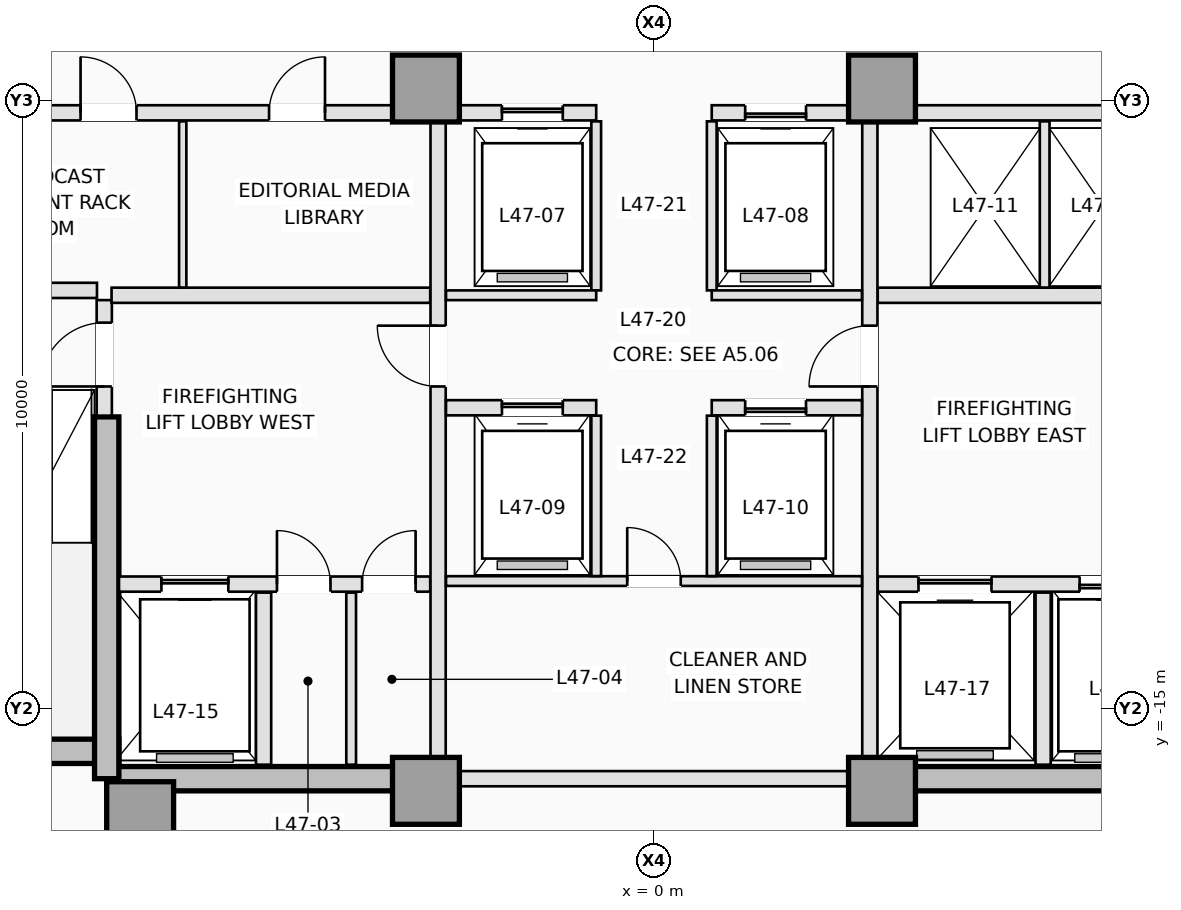
"""IFC4 building model, lengths in metres.
Left out: names, types, materials, properties, quantities, classifications, styles, units other than length and angle.
Written with IfcOpenShell. Run it as: python <this file> out.ifc"""

import sys

from ifc_helpers import new_model, si_unit, direction, frame, frame_2d, origin, origin_2d, place, context, subcontext, project, spatial, rectangle, extrude, element, fill, save


model = new_model("IFC4")
c1 = context("Model", 3, precision=1e-05, world=origin(), true_north=direction((0.0, 1.0)))
c2 = subcontext(c1, "Body", "Model", "MODEL_VIEW")
j1 = project(units=[si_unit("LENGTHUNIT", "METRE"), si_unit("PLANEANGLEUNIT", "RADIAN")], contexts=[c1])
p1 = place(None, origin())
s1 = spatial("IfcSite", under=j1, at=p1, CompositionType="ELEMENT")
p2 = place(p1, origin())
s2 = spatial("IfcBuilding", under=s1, at=p2, CompositionType="ELEMENT")
p3 = place(p2, frame((0.0, 0.0, 172.0)))
s3 = spatial("IfcBuildingStorey", under=s2, at=p3, CompositionType="ELEMENT", Elevation=172.0)
p4 = place(p3, frame((-12.6, -15.7, 0.0), z_axis=(0.0, 0.0, 1.0), x_axis=(1.0, 0.0, 0.0)))
e1 = element("IfcWall", 1, at=p4, inside=s3, PredefinedType="SHEAR", context=c2, shape_type="SweptSolid", body=[
    extrude(rectangle(XDim=3.8, YDim=0.4, at=frame_2d((1.9, 0.0))), origin(), (0.0, 0.0, 1.0), 3.5),
])
for number, where, z_axis, x_axis in (
    (2, (-9.0, -16.15, 0.0), (0.0, 0.0, 1.0), (1.0, 0.0, 0.0)),
    (3, (3.75, -16.15, 0.0), (0.0, 0.0, 1.0), (1.0, 0.0, 0.0)),
):
    element("IfcWall", number, at=place(p3, frame(where, z_axis=z_axis, x_axis=x_axis)), inside=s3, PredefinedType="SHEAR", context=c2, shape_type="SweptSolid", body=[
        extrude(rectangle(XDim=5.25, YDim=0.4, at=frame_2d((2.625, 0.0))), origin(), (0.0, 0.0, 1.0), 3.5),
    ])
p5 = place(p3, frame((-9.0, -16.15, 0.0), z_axis=(0.0, 0.0, 1.0), x_axis=(0.0, 1.0, 0.0)))
e4 = element("IfcWall", 4, at=p5, inside=s3, PredefinedType="SHEAR", context=c2, shape_type="SweptSolid", body=[
    extrude(rectangle(XDim=5.95, YDim=0.4, at=frame_2d((2.975, 0.0))), origin(), (0.0, 0.0, 1.0), 3.5),
])
for number, where, z_axis, x_axis in (
    (5, (-8.45, -16.75, 0.0), (0.0, 0.0, 1.0), (1.0, 0.0, 0.0)),
    (6, (-3.75, -16.35, 0.0), (0.0, 0.0, 1.0), (1.0, 0.0, 0.0)),
    (7, (3.75, -16.35, 0.0), (0.0, 0.0, 1.0), (1.0, 0.0, 0.0)),
    (8, (-3.75, -4.8, 0.0), (0.0, 0.0, 1.0), (1.0, 0.0, 0.0)),
    (9, (3.75, -4.8, 0.0), (0.0, 0.0, 1.0), (1.0, 0.0, 0.0)),
):
    element("IfcColumn", number, at=place(p3, frame(where, z_axis=z_axis, x_axis=x_axis)), inside=s3, PredefinedType="COLUMN", context=c2, shape_type="SweptSolid", body=[
        extrude(rectangle(XDim=1.1, YDim=1.1, at=origin_2d()), origin(), (0.0, 0.0, 1.0), 3.5),
    ])
p6 = place(p3, frame((-9.04, -10.18, 0.0), z_axis=(0.0, 0.0, 1.0), x_axis=(0.0, 1.0, 0.0)))
e10 = element("IfcWall", 10, at=p6, inside=s3, PredefinedType="PARTITIONING", context=c2, shape_type="SweptSolid", body=[
    extrude(rectangle(XDim=1.9, YDim=0.25, at=frame_2d((0.95, 0.0))), origin(), (0.0, 0.0, 1.0), 3.25),
])
p7 = place(p6, frame((0.48, 0.0, 0.0)))
e11 = element("IfcOpeningElement", 11, at=p7, cuts=e10, PredefinedType="OPENING", context=c2, shape_type="SweptSolid", body=[
    extrude(rectangle(XDim=1.05, YDim=2.15, at=frame_2d((0.525, 1.075))), frame((0.0, 0.135, 0.0), z_axis=(0.0, -1.0, 0.0), x_axis=(1.0, 0.0, 0.0)), (0.0, 0.0, 1.0), 0.27),
])
p8 = place(p3, frame((-12.38, -8.12, 0.0), z_axis=(0.0, 0.0, 1.0), x_axis=(1.0, 0.0, 0.0)))
e12 = element("IfcWall", 12, at=p8, inside=s3, PredefinedType="PARTITIONING", context=c2, shape_type="SweptSolid", body=[
    extrude(rectangle(XDim=3.22, YDim=0.25, at=frame_2d((1.61, 0.0))), origin(), (0.0, 0.0, 1.0), 3.25),
])
p9 = place(p3, frame((-8.798, -12.95, 0.0), z_axis=(0.0, 0.0, 1.0), x_axis=(1.0, 0.0, 0.0)))
e13 = element("IfcWall", 13, at=p9, inside=s3, PredefinedType="PARTITIONING", context=c2, shape_type="SweptSolid", body=[
    extrude(rectangle(XDim=5.118, YDim=0.25, at=frame_2d((2.559, 0.0))), origin(), (0.0, 0.0, 1.0), 3.25),
])
p10 = place(p9, frame((0.698, 0.0, 0.0)))
e14 = element("IfcOpeningElement", 14, at=p10, cuts=e13, PredefinedType="OPENING", context=c2, shape_type="SweptSolid", body=[
    extrude(rectangle(XDim=1.1, YDim=2.15, at=frame_2d((0.55, 1.075))), frame((0.0, 0.135, 0.0), z_axis=(0.0, -1.0, 0.0), x_axis=(1.0, 0.0, 0.0)), (0.0, 0.0, 1.0), 0.27),
])
p11 = place(p9, frame((2.598, 0.0, 0.0)))
e15 = element("IfcOpeningElement", 15, at=p11, cuts=e13, PredefinedType="OPENING", context=c2, shape_type="SweptSolid", body=[
    extrude(rectangle(XDim=0.88, YDim=2.1, at=frame_2d((0.44, 1.05))), frame((0.0, 0.135, 0.0), z_axis=(0.0, -1.0, 0.0), x_axis=(1.0, 0.0, 0.0)), (0.0, 0.0, 1.0), 0.27),
])
p12 = place(p9, frame((3.998, 0.0, 0.0)))
e16 = element("IfcOpeningElement", 16, at=p12, cuts=e13, PredefinedType="OPENING", context=c2, shape_type="SweptSolid", body=[
    extrude(rectangle(XDim=0.88, YDim=2.1, at=frame_2d((0.44, 1.05))), frame((0.0, 0.135, 0.0), z_axis=(0.0, -1.0, 0.0), x_axis=(1.0, 0.0, 0.0)), (0.0, 0.0, 1.0), 0.27),
])
p13 = place(p3, frame((3.68, -12.95, 0.0), z_axis=(0.0, 0.0, 1.0), x_axis=(1.0, 0.0, 0.0)))
e17 = element("IfcWall", 17, at=p13, inside=s3, PredefinedType="PARTITIONING", context=c2, shape_type="SweptSolid", body=[
    extrude(rectangle(XDim=5.118, YDim=0.25, at=frame_2d((2.559, 0.0))), origin(), (0.0, 0.0, 1.0), 3.25),
])
p14 = place(p13, frame((3.32, 0.0, 0.0)))
e18 = element("IfcOpeningElement", 18, at=p14, cuts=e17, PredefinedType="OPENING", context=c2, shape_type="SweptSolid", body=[
    extrude(rectangle(XDim=1.1, YDim=2.15, at=frame_2d((0.55, 1.075))), frame((0.0, 0.135, 0.0), z_axis=(0.0, -1.0, 0.0), x_axis=(1.0, 0.0, 0.0)), (0.0, 0.0, 1.0), 0.27),
])
p15 = place(p13, frame((0.67, 0.0, 0.0)))
e19 = element("IfcOpeningElement", 19, at=p15, cuts=e17, PredefinedType="OPENING", context=c2, shape_type="SweptSolid", body=[
    extrude(rectangle(XDim=1.2, YDim=2.15, at=frame_2d((0.6, 1.075))), frame((0.0, 0.135, 0.0), z_axis=(0.0, -1.0, 0.0), x_axis=(1.0, 0.0, 0.0)), (0.0, 0.0, 1.0), 0.27),
])
p16 = place(p3, frame((-6.42, -15.92, 0.0), z_axis=(0.0, 0.0, 1.0), x_axis=(0.0, 1.0, 0.0)))
e20 = element("IfcWall", 20, at=p16, inside=s3, PredefinedType="PARTITIONING", context=c2, shape_type="SweptSolid", body=[
    extrude(rectangle(XDim=2.83, YDim=0.25, at=frame_2d((1.415, 0.0))), origin(), (0.0, 0.0, 1.0), 3.25),
])
p17 = place(p3, frame((-4.98, -15.92, 0.0), z_axis=(0.0, 0.0, 1.0), x_axis=(0.0, 1.0, 0.0)))
e21 = element("IfcWall", 21, at=p17, inside=s3, PredefinedType="PARTITIONING", context=c2, shape_type="SweptSolid", body=[
    extrude(rectangle(XDim=2.83, YDim=0.16, at=frame_2d((1.415, 0.0))), origin(), (0.0, 0.0, 1.0), 3.25),
])
p18 = place(p3, frame((6.4, -15.92, 0.0), z_axis=(0.0, 0.0, 1.0), x_axis=(0.0, 1.0, 0.0)))
e22 = element("IfcWall", 22, at=p18, inside=s3, PredefinedType="PARTITIONING", context=c2, shape_type="SweptSolid", body=[
    extrude(rectangle(XDim=2.83, YDim=0.25, at=frame_2d((1.415, 0.0))), origin(), (0.0, 0.0, 1.0), 3.25),
])
for number, where, z_axis, x_axis in (
    (23, (-8.92, -8.2, 0.0), (0.0, 0.0, 1.0), (1.0, 0.0, 0.0)),
    (24, (3.68, -8.2, 0.0), (0.0, 0.0, 1.0), (1.0, 0.0, 0.0)),
):
    element("IfcWall", number, at=place(p3, frame(where, z_axis=z_axis, x_axis=x_axis)), inside=s3, PredefinedType="PARTITIONING", context=c2, shape_type="SweptSolid", body=[
        extrude(rectangle(XDim=5.24, YDim=0.25, at=frame_2d((2.62, 0.0))), origin(), (0.0, 0.0, 1.0), 3.25),
    ])
p19 = place(p3, frame((-3.55, -15.798, 0.0), z_axis=(0.0, 0.0, 1.0), x_axis=(0.0, 1.0, 0.0)))
e25 = element("IfcWall", 25, at=p19, inside=s3, PredefinedType="PARTITIONING", context=c2, shape_type="SweptSolid", body=[
    extrude(rectangle(XDim=10.446, YDim=0.25, at=frame_2d((5.223, 0.0))), origin(), (0.0, 0.0, 1.0), 3.25),
])
p20 = place(p19, frame((6.098, 0.0, 0.0)))
e26 = element("IfcOpeningElement", 26, at=p20, cuts=e25, PredefinedType="OPENING", context=c2, shape_type="SweptSolid", body=[
    extrude(rectangle(XDim=1.0, YDim=2.15, at=frame_2d((0.5, 1.075))), frame((0.0, 0.135, 0.0), z_axis=(0.0, -1.0, 0.0), x_axis=(1.0, 0.0, 0.0)), (0.0, 0.0, 1.0), 0.27),
])
p21 = place(p3, frame((3.55, -15.798, 0.0), z_axis=(0.0, 0.0, 1.0), x_axis=(0.0, 1.0, 0.0)))
e27 = element("IfcWall", 27, at=p21, inside=s3, PredefinedType="PARTITIONING", context=c2, shape_type="SweptSolid", body=[
    extrude(rectangle(XDim=10.446, YDim=0.25, at=frame_2d((5.223, 0.0))), origin(), (0.0, 0.0, 1.0), 3.25),
])
p22 = place(p21, frame((6.098, 0.0, 0.0)))
e28 = element("IfcOpeningElement", 28, at=p22, cuts=e27, PredefinedType="OPENING", context=c2, shape_type="SweptSolid", body=[
    extrude(rectangle(XDim=1.0, YDim=2.15, at=frame_2d((0.5, 1.075))), frame((0.0, 0.135, 0.0), z_axis=(0.0, -1.0, 0.0), x_axis=(1.0, 0.0, 0.0)), (0.0, 0.0, 1.0), 0.27),
])
p23 = place(p3, frame((-12.398, -5.2, 0.0), z_axis=(0.0, 0.0, 1.0), x_axis=(1.0, 0.0, 0.0)))
e29 = element("IfcWall", 29, at=p23, inside=s3, PredefinedType="PARTITIONING", context=c2, shape_type="SweptSolid", body=[
    extrude(rectangle(XDim=8.096, YDim=0.25, at=frame_2d((4.048, 0.0))), origin(), (0.0, 0.0, 1.0), 3.25),
])
p24 = place(p23, frame((2.968, 0.0, 0.0)))
e30 = element("IfcOpeningElement", 30, at=p24, cuts=e29, PredefinedType="OPENING", context=c2, shape_type="SweptSolid", body=[
    extrude(rectangle(XDim=0.92, YDim=2.12, at=frame_2d((0.46, 1.06))), frame((0.0, 0.135, 0.0), z_axis=(0.0, -1.0, 0.0), x_axis=(1.0, 0.0, 0.0)), (0.0, 0.0, 1.0), 0.27),
])
p25 = place(p23, frame((6.068, 0.0, 0.0)))
e31 = element("IfcOpeningElement", 31, at=p25, cuts=e29, PredefinedType="OPENING", context=c2, shape_type="SweptSolid", body=[
    extrude(rectangle(XDim=0.92, YDim=2.12, at=frame_2d((0.46, 1.06))), frame((0.0, 0.135, 0.0), z_axis=(0.0, -1.0, 0.0), x_axis=(1.0, 0.0, 0.0)), (0.0, 0.0, 1.0), 0.27),
])
p26 = place(p3, frame((4.302, -5.2, 0.0), z_axis=(0.0, 0.0, 1.0), x_axis=(1.0, 0.0, 0.0)))
e32 = element("IfcWall", 32, at=p26, inside=s3, PredefinedType="PARTITIONING", context=c2, shape_type="SweptSolid", body=[
    extrude(rectangle(XDim=8.096, YDim=0.25, at=frame_2d((4.048, 0.0))), origin(), (0.0, 0.0, 1.0), 3.25),
])
p27 = place(p3, frame((-3.198, -5.2, 0.0), z_axis=(0.0, 0.0, 1.0), x_axis=(1.0, 0.0, 0.0)))
e33 = element("IfcWall", 33, at=p27, inside=s3, PredefinedType="PARTITIONING", context=c2, shape_type="SweptSolid", body=[
    extrude(rectangle(XDim=2.248, YDim=0.25, at=frame_2d((1.124, 0.0))), origin(), (0.0, 0.0, 1.0), 3.25),
])
p28 = place(p27, frame((0.698, 0.0, 0.0)))
e34 = element("IfcOpeningElement", 34, at=p28, cuts=e33, PredefinedType="OPENING", context=c2, shape_type="SweptSolid", body=[
    extrude(rectangle(XDim=1.0, YDim=2.15, at=frame_2d((0.5, 1.075))), frame((0.0, 0.135, 0.0), z_axis=(0.0, -1.0, 0.0), x_axis=(1.0, 0.0, 0.0)), (0.0, 0.0, 1.0), 0.27),
])
p29 = place(p3, frame((0.95, -5.2, 0.0), z_axis=(0.0, 0.0, 1.0), x_axis=(1.0, 0.0, 0.0)))
e35 = element("IfcWall", 35, at=p29, inside=s3, PredefinedType="PARTITIONING", context=c2, shape_type="SweptSolid", body=[
    extrude(rectangle(XDim=2.248, YDim=0.25, at=frame_2d((1.124, 0.0))), origin(), (0.0, 0.0, 1.0), 3.25),
])
p30 = place(p29, frame((0.55, 0.0, 0.0)))
e36 = element("IfcOpeningElement", 36, at=p30, cuts=e35, PredefinedType="OPENING", context=c2, shape_type="SweptSolid", body=[
    extrude(rectangle(XDim=1.0, YDim=2.15, at=frame_2d((0.5, 1.075))), frame((0.0, 0.135, 0.0), z_axis=(0.0, -1.0, 0.0), x_axis=(1.0, 0.0, 0.0)), (0.0, 0.0, 1.0), 0.27),
])
p31 = place(p3, frame((-7.75, -8.073, 0.0), z_axis=(0.0, 0.0, 1.0), x_axis=(0.0, 1.0, 0.0)))
e37 = element("IfcWall", 37, at=p31, inside=s3, PredefinedType="PARTITIONING", context=c2, shape_type="SweptSolid", body=[
    extrude(rectangle(XDim=2.733, YDim=0.12, at=frame_2d((1.366, 0.0))), origin(), (0.0, 0.0, 1.0), 3.25),
])
p32 = place(p3, frame((6.425, -8.073, 0.0), z_axis=(0.0, 0.0, 1.0), x_axis=(0.0, 1.0, 0.0)))
e38 = element("IfcWall", 38, at=p32, inside=s3, PredefinedType="PARTITIONING", context=c2, shape_type="SweptSolid", body=[
    extrude(rectangle(XDim=2.733, YDim=0.16, at=frame_2d((1.366, 0.0))), origin(), (0.0, 0.0, 1.0), 3.25),
])
p33 = place(p3, frame((-3.198, -16.15, 0.0), z_axis=(0.0, 0.0, 1.0), x_axis=(1.0, 0.0, 0.0)))
e39 = element("IfcWall", 39, at=p33, inside=s3, PredefinedType="PARTITIONING", context=c2, shape_type="SweptSolid", body=[
    extrude(rectangle(XDim=6.396, YDim=0.25, at=frame_2d((3.198, 0.0))), origin(), (0.0, 0.0, 1.0), 2.45),
])
for number, where, z_axis, x_axis in (
    (40, (-0.95, -8.12, 0.0), (0.0, 0.0, 1.0), (0.0, 1.0, 0.0)),
    (41, (0.95, -8.12, 0.0), (0.0, 0.0, 1.0), (0.0, 1.0, 0.0)),
):
    element("IfcWall", number, at=place(p3, frame(where, z_axis=z_axis, x_axis=x_axis)), inside=s3, PredefinedType="PARTITIONING", context=c2, shape_type="SweptSolid", body=[
        extrude(rectangle(XDim=2.78, YDim=0.16, at=frame_2d((1.39, 0.0))), origin(), (0.0, 0.0, 1.0), 3.25),
    ])
for number, where, z_axis, x_axis in (
    (42, (-3.42, -8.2, 0.0), (0.0, 0.0, 1.0), (1.0, 0.0, 0.0)),
    (43, (0.95, -8.2, 0.0), (0.0, 0.0, 1.0), (1.0, 0.0, 0.0)),
):
    element("IfcWall", number, at=place(p3, frame(where, z_axis=z_axis, x_axis=x_axis)), inside=s3, PredefinedType="PARTITIONING", context=c2, shape_type="SweptSolid", body=[
        extrude(rectangle(XDim=2.47, YDim=0.16, at=frame_2d((1.235, 0.0))), origin(), (0.0, 0.0, 1.0), 3.25),
    ])
p34 = place(p3, frame((-3.42, -10.05, 0.0), z_axis=(0.0, 0.0, 1.0), x_axis=(1.0, 0.0, 0.0)))
e44 = element("IfcWall", 44, at=p34, inside=s3, PredefinedType="PARTITIONING", context=c2, shape_type="SweptSolid", body=[
    extrude(rectangle(XDim=2.47, YDim=0.25, at=frame_2d((1.235, 0.0))), origin(), (0.0, 0.0, 1.0), 3.25),
])
p35 = place(p34, frame((0.92, 0.0, 0.0)))
e45 = element("IfcOpeningElement", 45, at=p35, cuts=e44, PredefinedType="OPENING", context=c2, shape_type="SweptSolid", body=[
    extrude(rectangle(XDim=1.0, YDim=2.15, at=frame_2d((0.5, 1.075))), frame((0.0, 0.135, 0.0), z_axis=(0.0, -1.0, 0.0), x_axis=(1.0, 0.0, 0.0)), (0.0, 0.0, 1.0), 0.27),
])
p36 = place(p3, frame((0.95, -10.05, 0.0), z_axis=(0.0, 0.0, 1.0), x_axis=(1.0, 0.0, 0.0)))
e46 = element("IfcWall", 46, at=p36, inside=s3, PredefinedType="PARTITIONING", context=c2, shape_type="SweptSolid", body=[
    extrude(rectangle(XDim=2.47, YDim=0.25, at=frame_2d((1.235, 0.0))), origin(), (0.0, 0.0, 1.0), 3.25),
])
p37 = place(p36, frame((0.55, 0.0, 0.0)))
e47 = element("IfcOpeningElement", 47, at=p37, cuts=e46, PredefinedType="OPENING", context=c2, shape_type="SweptSolid", body=[
    extrude(rectangle(XDim=1.0, YDim=2.15, at=frame_2d((0.5, 1.075))), frame((0.0, 0.135, 0.0), z_axis=(0.0, -1.0, 0.0), x_axis=(1.0, 0.0, 0.0)), (0.0, 0.0, 1.0), 0.27),
])
p38 = place(p3, frame((-3.42, -12.9, 0.0), z_axis=(0.0, 0.0, 1.0), x_axis=(1.0, 0.0, 0.0)))
e48 = element("IfcWall", 48, at=p38, inside=s3, PredefinedType="PARTITIONING", context=c2, shape_type="SweptSolid", body=[
    extrude(rectangle(XDim=6.84, YDim=0.16, at=frame_2d((3.42, 0.0))), origin(), (0.0, 0.0, 1.0), 3.25),
])
p39 = place(p38, frame((2.98, 0.0, 0.0)))
e49 = element("IfcOpeningElement", 49, at=p39, cuts=e48, PredefinedType="OPENING", context=c2, shape_type="SweptSolid", body=[
    extrude(rectangle(XDim=0.88, YDim=2.12, at=frame_2d((0.44, 1.06))), frame((0.0, 0.09, 0.0), z_axis=(0.0, -1.0, 0.0), x_axis=(1.0, 0.0, 0.0)), (0.0, 0.0, 1.0), 0.18),
])
for number, where, z_axis, x_axis in (
    (50, (-0.95, -12.818, 0.0), (0.0, 0.0, 1.0), (0.0, 1.0, 0.0)),
    (51, (0.95, -12.818, 0.0), (0.0, 0.0, 1.0), (0.0, 1.0, 0.0)),
):
    element("IfcWall", number, at=place(p3, frame(where, z_axis=z_axis, x_axis=x_axis)), inside=s3, PredefinedType="PARTITIONING", context=c2, shape_type="SweptSolid", body=[
        extrude(rectangle(XDim=2.638, YDim=0.16, at=frame_2d((1.319, 0.0))), origin(), (0.0, 0.0, 1.0), 3.25),
    ])
p40 = place(p28, origin())
e52 = element("IfcDoor", 52, at=p40, inside=s3, OperationType="SLIDING_TO_LEFT", PredefinedType="DOOR", context=c2, shape_type="SweptSolid", body=[
    extrude(rectangle(XDim=1.0, YDim=2.15, at=frame_2d((0.5, 1.075))), frame((0.0, 0.025, 0.0), z_axis=(0.0, -1.0, 0.0), x_axis=(1.0, 0.0, 0.0)), (0.0, 0.0, 1.0), 0.05),
])
fill(e34, e52)
p41 = place(p30, origin())
e53 = element("IfcDoor", 53, at=p41, inside=s3, OperationType="SLIDING_TO_RIGHT", PredefinedType="DOOR", context=c2, shape_type="SweptSolid", body=[
    extrude(rectangle(XDim=1.0, YDim=2.15, at=frame_2d((0.5, 1.075))), frame((0.0, 0.025, 0.0), z_axis=(0.0, -1.0, 0.0), x_axis=(1.0, 0.0, 0.0)), (0.0, 0.0, 1.0), 0.05),
])
fill(e36, e53)
p42 = place(p10, origin())
e54 = element("IfcDoor", 54, at=p42, inside=s3, OperationType="SLIDING_TO_LEFT", PredefinedType="DOOR", context=c2, shape_type="SweptSolid", body=[
    extrude(rectangle(XDim=1.1, YDim=2.15, at=frame_2d((0.55, 1.075))), frame((0.0, 0.025, 0.0), z_axis=(0.0, -1.0, 0.0), x_axis=(1.0, 0.0, 0.0)), (0.0, 0.0, 1.0), 0.05),
])
fill(e14, e54)
p43 = place(p14, origin())
e55 = element("IfcDoor", 55, at=p43, inside=s3, OperationType="SLIDING_TO_RIGHT", PredefinedType="DOOR", context=c2, shape_type="SweptSolid", body=[
    extrude(rectangle(XDim=1.1, YDim=2.15, at=frame_2d((0.55, 1.075))), frame((0.0, 0.025, 0.0), z_axis=(0.0, -1.0, 0.0), x_axis=(1.0, 0.0, 0.0)), (0.0, 0.0, 1.0), 0.05),
])
fill(e18, e55)
p44 = place(p15, origin())
e56 = element("IfcDoor", 56, at=p44, inside=s3, OperationType="SLIDING_TO_LEFT", PredefinedType="DOOR", context=c2, shape_type="SweptSolid", body=[
    extrude(rectangle(XDim=1.2, YDim=2.15, at=frame_2d((0.6, 1.075))), frame((0.0, 0.025, 0.0), z_axis=(0.0, -1.0, 0.0), x_axis=(1.0, 0.0, 0.0)), (0.0, 0.0, 1.0), 0.05),
])
fill(e19, e56)
p45 = place(p35, origin())
e57 = element("IfcDoor", 57, at=p45, inside=s3, OperationType="SLIDING_TO_LEFT", PredefinedType="DOOR", context=c2, shape_type="SweptSolid", body=[
    extrude(rectangle(XDim=1.0, YDim=2.15, at=frame_2d((0.5, 1.075))), frame((0.0, 0.025, 0.0), z_axis=(0.0, -1.0, 0.0), x_axis=(1.0, 0.0, 0.0)), (0.0, 0.0, 1.0), 0.05),
])
fill(e45, e57)
p46 = place(p37, origin())
e58 = element("IfcDoor", 58, at=p46, inside=s3, OperationType="SLIDING_TO_RIGHT", PredefinedType="DOOR", context=c2, shape_type="SweptSolid", body=[
    extrude(rectangle(XDim=1.0, YDim=2.15, at=frame_2d((0.5, 1.075))), frame((0.0, 0.025, 0.0), z_axis=(0.0, -1.0, 0.0), x_axis=(1.0, 0.0, 0.0)), (0.0, 0.0, 1.0), 0.05),
])
fill(e47, e58)
p47 = place(p7, origin())
e59 = element("IfcDoor", 59, at=p47, inside=s3, OperationType="SINGLE_SWING_LEFT", PredefinedType="DOOR", context=c2, shape_type="SweptSolid", body=[
    extrude(rectangle(XDim=1.05, YDim=2.15, at=frame_2d((0.525, 1.075))), frame((0.0, 0.025, 0.0), z_axis=(0.0, -1.0, 0.0), x_axis=(1.0, 0.0, 0.0)), (0.0, 0.0, 1.0), 0.05),
])
fill(e11, e59)
p48 = place(p11, origin())
e60 = element("IfcDoor", 60, at=p48, inside=s3, OperationType="SINGLE_SWING_LEFT", PredefinedType="TRAPDOOR", context=c2, shape_type="SweptSolid", body=[
    extrude(rectangle(XDim=0.88, YDim=2.1, at=frame_2d((0.44, 1.05))), frame((0.0, 0.025, 0.0), z_axis=(0.0, -1.0, 0.0), x_axis=(1.0, 0.0, 0.0)), (0.0, 0.0, 1.0), 0.05),
])
fill(e15, e60)
p49 = place(p12, origin())
e61 = element("IfcDoor", 61, at=p49, inside=s3, OperationType="SINGLE_SWING_RIGHT", PredefinedType="TRAPDOOR", context=c2, shape_type="SweptSolid", body=[
    extrude(rectangle(XDim=0.88, YDim=2.1, at=frame_2d((0.44, 1.05))), frame((0.0, 0.025, 0.0), z_axis=(0.0, -1.0, 0.0), x_axis=(1.0, 0.0, 0.0)), (0.0, 0.0, 1.0), 0.05),
])
fill(e16, e61)
p50 = place(p20, origin())
e62 = element("IfcDoor", 62, at=p50, inside=s3, OperationType="SINGLE_SWING_RIGHT", PredefinedType="DOOR", context=c2, shape_type="SweptSolid", body=[
    extrude(rectangle(XDim=1.0, YDim=2.15, at=frame_2d((0.5, 1.075))), frame((0.0, 0.025, 0.0), z_axis=(0.0, -1.0, 0.0), x_axis=(1.0, 0.0, 0.0)), (0.0, 0.0, 1.0), 0.05),
])
fill(e26, e62)
p51 = place(p22, origin())
e63 = element("IfcDoor", 63, at=p51, inside=s3, OperationType="SINGLE_SWING_LEFT", PredefinedType="DOOR", context=c2, shape_type="SweptSolid", body=[
    extrude(rectangle(XDim=1.0, YDim=2.15, at=frame_2d((0.5, 1.075))), frame((0.0, 0.025, 0.0), z_axis=(0.0, -1.0, 0.0), x_axis=(1.0, 0.0, 0.0)), (0.0, 0.0, 1.0), 0.05),
])
fill(e28, e63)
p52 = place(p24, origin())
e64 = element("IfcDoor", 64, at=p52, inside=s3, OperationType="SINGLE_SWING_LEFT", PredefinedType="DOOR", context=c2, shape_type="SweptSolid", body=[
    extrude(rectangle(XDim=0.92, YDim=2.12, at=frame_2d((0.46, 1.06))), frame((0.0, 0.025, 0.0), z_axis=(0.0, -1.0, 0.0), x_axis=(1.0, 0.0, 0.0)), (0.0, 0.0, 1.0), 0.05),
])
fill(e30, e64)
p53 = place(p25, origin())
e65 = element("IfcDoor", 65, at=p53, inside=s3, OperationType="SINGLE_SWING_RIGHT", PredefinedType="DOOR", context=c2, shape_type="SweptSolid", body=[
    extrude(rectangle(XDim=0.92, YDim=2.12, at=frame_2d((0.46, 1.06))), frame((0.0, 0.025, 0.0), z_axis=(0.0, -1.0, 0.0), x_axis=(1.0, 0.0, 0.0)), (0.0, 0.0, 1.0), 0.05),
])
fill(e31, e65)
p54 = place(p39, origin())
e66 = element("IfcDoor", 66, at=p54, inside=s3, OperationType="SINGLE_SWING_LEFT", PredefinedType="DOOR", context=c2, shape_type="SweptSolid", body=[
    extrude(rectangle(XDim=0.88, YDim=2.12, at=frame_2d((0.44, 1.06))), frame((0.0, 0.025, 0.0), z_axis=(0.0, -1.0, 0.0), x_axis=(1.0, 0.0, 0.0)), (0.0, 0.0, 1.0), 0.05),
])
fill(e49, e66)
save(model, sys.argv[1])
